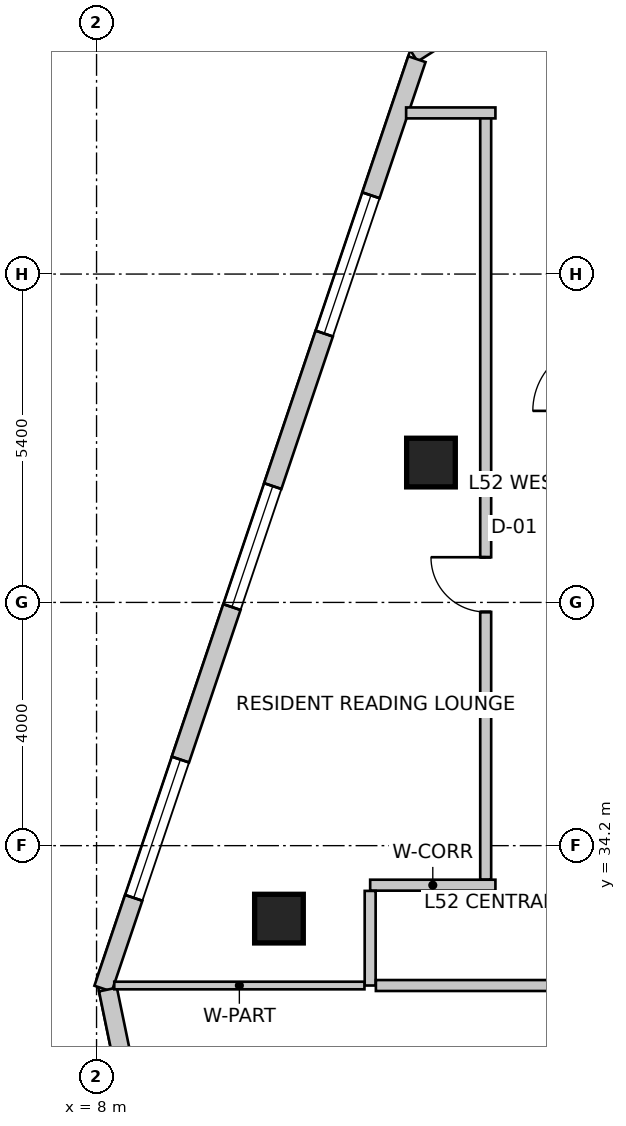
"""IFC4 building model, lengths in metres.
Left out: names, types, materials, properties, quantities, classifications, styles, units other than length and angle.
Written with IfcOpenShell. Run it as: python <this file> out.ifc"""

import sys

from ifc_helpers import new_model, si_unit, direction, frame, frame_2d, origin, origin_2d, place, context, subcontext, project, spatial, rectangle, extrude, source, transform, mapped, element, fill, save


model = new_model("IFC4")
c1 = context("Model", 3, precision=1e-05, world=origin(), true_north=direction((0.0, 1.0)))
c2 = subcontext(c1, "Body", "Model", "MODEL_VIEW")
j1 = project(units=[si_unit("LENGTHUNIT", "METRE"), si_unit("PLANEANGLEUNIT", "RADIAN")], contexts=[c1])
p1 = place(None, origin())
s1 = spatial("IfcSite", under=j1, at=p1, CompositionType="ELEMENT")
p2 = place(p1, origin())
s2 = spatial("IfcBuilding", under=s1, at=p2, CompositionType="ELEMENT")
p3 = place(p2, frame((0.0, 0.0, 207.9)))
s3 = spatial("IfcBuildingStorey", under=s2, at=p3, CompositionType="ELEMENT", Elevation=207.9)
m1 = source(origin(), c2, "Body", "SweptSolid", [
    extrude(rectangle(XDim=0.8, YDim=0.8, at=origin_2d()), origin(), (0.0, 0.0, 1.0), 3.5),
])
for number, where, z_axis, x_axis in (
    (1, (11.0, 33.0, 0.0), (0.0, 0.0, 1.0), (1.0, 0.0, 0.0)),
    (2, (13.5, 40.5, 0.0), (0.0, 0.0, 1.0), (1.0, 0.0, 0.0)),
):
    element("IfcColumn", number, at=place(p3, frame(where, z_axis=z_axis, x_axis=x_axis)), inside=s3, PredefinedType="COLUMN", context=c2, shape_type="MappedRepresentation", body=[
        mapped(m1, transform((0.0, 0.0, 0.0), scale=1.0)),
    ])
p4 = place(p3, frame((21.875, 52.742, 0.0), z_axis=(0.0, 0.0, 1.0), x_axis=(-0.843666375448, -0.536867811419, 0.0)))
e3 = element("IfcWall", 3, at=p4, inside=s3, PredefinedType="SOLIDWALL", context=c2, shape_type="SweptSolid", body=[
    extrude(rectangle(XDim=10.284, YDim=0.3, at=frame_2d((5.142, 0.0))), origin(), (0.0, 0.0, 1.0), 3.2),
])
m2 = source(origin(), c2, "Body", "SweptSolid", [
    extrude(rectangle(XDim=2.1, YDim=2.0, at=frame_2d((1.05, 1.0))), frame((0.0, 0.16, 0.0), z_axis=(0.0, -1.0, 0.0), x_axis=(1.0, 0.0, 0.0)), (0.0, 0.0, 1.0), 0.32),
])
p5 = place(p4, frame((3.457, 0.0, 0.85)))
e4 = element("IfcOpeningElement", 4, at=p5, cuts=e3, PredefinedType="OPENING", context=c2, shape_type="MappedRepresentation", body=[
    mapped(m2, transform((0.0, 0.0, 0.0), scale=1.0)),
])
p6 = place(p3, frame((13.269, 47.134, 0.0), z_axis=(0.0, 0.0, 1.0), x_axis=(-0.319920776449, -0.947444297464, 0.0)))
e5 = element("IfcWall", 5, at=p6, inside=s3, PredefinedType="SOLIDWALL", context=c2, shape_type="SweptSolid", body=[
    extrude(rectangle(XDim=16.133, YDim=0.3, at=frame_2d((8.067, 0.0))), origin(), (0.0, 0.0, 1.0), 3.2),
])
m3 = source(origin(), c2, "Body", "SweptSolid", [
    extrude(rectangle(XDim=2.4, YDim=2.2, at=frame_2d((1.2, 1.1))), frame((0.0, 0.16, 0.0), z_axis=(0.0, -1.0, 0.0), x_axis=(1.0, 0.0, 0.0)), (0.0, 0.0, 1.0), 0.32),
])
p7 = place(p6, frame((2.363, 0.0, 0.85)))
e6 = element("IfcOpeningElement", 6, at=p7, cuts=e5, PredefinedType="OPENING", context=c2, shape_type="MappedRepresentation", body=[
    mapped(m3, transform((0.0, 0.0, 0.0), scale=1.0)),
])
p8 = place(p6, frame((7.41, 0.0, 0.85)))
e7 = element("IfcOpeningElement", 7, at=p8, cuts=e5, PredefinedType="OPENING", context=c2, shape_type="MappedRepresentation", body=[
    mapped(m2, transform((0.0, 0.0, 0.0), scale=1.0)),
])
p9 = place(p6, frame((12.157, 0.0, 0.85)))
e8 = element("IfcOpeningElement", 8, at=p9, cuts=e5, PredefinedType="OPENING", context=c2, shape_type="MappedRepresentation", body=[
    mapped(m3, transform((0.0, 0.0, 0.0), scale=1.0)),
])
p10 = place(p3, frame((8.188, 31.834, 0.0), z_axis=(0.0, 0.0, 1.0), x_axis=(0.202303475707, -0.979322880217, 0.0)))
e9 = element("IfcWall", 9, at=p10, inside=s3, PredefinedType="SOLIDWALL", context=c2, shape_type="SweptSolid", body=[
    extrude(rectangle(XDim=15.766, YDim=0.3, at=frame_2d((7.883, 0.0))), origin(), (0.0, 0.0, 1.0), 3.2),
])
m4 = source(origin(), c2, "Body", "SweptSolid", [
    extrude(rectangle(XDim=1.6, YDim=2.15, at=frame_2d((0.8, 1.075))), frame((0.0, 0.16, 0.0), z_axis=(0.0, -1.0, 0.0), x_axis=(1.0, 0.0, 0.0)), (0.0, 0.0, 1.0), 0.32),
])
p11 = place(p10, frame((9.466, 0.0, 0.0)))
e10 = element("IfcOpeningElement", 10, at=p11, cuts=e9, PredefinedType="OPENING", context=c2, shape_type="MappedRepresentation", body=[
    mapped(m4, transform((0.0, 0.0, 0.0), scale=1.0)),
])
p12 = place(p10, frame((1.487, 0.0, 0.85)))
e11 = element("IfcOpeningElement", 11, at=p12, cuts=e9, PredefinedType="OPENING", context=c2, shape_type="MappedRepresentation", body=[
    mapped(m2, transform((0.0, 0.0, 0.0), scale=1.0)),
])
p13 = place(p10, frame((5.769, 0.0, 0.85)))
e12 = element("IfcOpeningElement", 12, at=p13, cuts=e9, PredefinedType="OPENING", context=c2, shape_type="MappedRepresentation", body=[
    mapped(m3, transform((0.0, 0.0, 0.0), scale=1.0)),
])
p14 = place(p10, frame((11.588, 0.0, 0.85)))
e13 = element("IfcOpeningElement", 13, at=p14, cuts=e9, PredefinedType="OPENING", context=c2, shape_type="MappedRepresentation", body=[
    mapped(m2, transform((0.0, 0.0, 0.0), scale=1.0)),
])
p15 = place(p3, frame((12.5, 33.55, 0.0), z_axis=(0.0, 0.0, 1.0), x_axis=(1.0, 0.0, 0.0)))
e14 = element("IfcWall", 14, at=p15, inside=s3, PredefinedType="PARTITIONING", context=c2, shape_type="SweptSolid", body=[
    extrude(rectangle(XDim=2.06, YDim=0.18, at=frame_2d((1.03, 0.0))), origin(), (0.0, 0.0, 1.0), 3.2),
])
p16 = place(p3, frame((12.5, 31.9, 0.0), z_axis=(0.0, 0.0, 1.0), x_axis=(0.0, 1.0, 0.0)))
e15 = element("IfcWall", 15, at=p16, inside=s3, PredefinedType="PARTITIONING", context=c2, shape_type="SweptSolid", body=[
    extrude(rectangle(XDim=1.556, YDim=0.18, at=frame_2d((0.778, 0.0))), origin(), (0.0, 0.0, 1.0), 2.869),
])
p17 = place(p3, frame((29.265, 31.9, 0.0), z_axis=(0.0, 0.0, 1.0), x_axis=(-1.0, 0.0, 0.0)))
e16 = element("IfcWall", 16, at=p17, inside=s3, PredefinedType="PARTITIONING", context=c2, shape_type="SweptSolid", body=[
    extrude(rectangle(XDim=16.671, YDim=0.18, at=frame_2d((8.335, 0.0))), origin(), (0.0, 0.0, 1.0), 2.869),
])
m5 = source(origin(), c2, "Body", "SweptSolid", [
    extrude(rectangle(XDim=1.6, YDim=2.15, at=frame_2d((0.8, 1.075))), frame((0.0, 0.1, 0.0), z_axis=(0.0, -1.0, 0.0), x_axis=(1.0, 0.0, 0.0)), (0.0, 0.0, 1.0), 0.2),
])
p18 = place(p17, frame((7.536, 0.0, 0.0)))
e17 = element("IfcOpeningElement", 17, at=p18, cuts=e16, PredefinedType="OPENING", context=c2, shape_type="MappedRepresentation", body=[
    mapped(m5, transform((0.0, 0.0, 0.0), scale=1.0)),
])
p19 = place(p3, frame((14.4, 33.644, 0.0), z_axis=(0.0, 0.0, 1.0), x_axis=(0.0, 1.0, 0.0)))
e18 = element("IfcWall", 18, at=p19, inside=s3, PredefinedType="PARTITIONING", context=c2, shape_type="SweptSolid", body=[
    extrude(rectangle(XDim=12.606, YDim=0.18, at=frame_2d((6.303, 0.0))), origin(), (0.0, 0.0, 1.0), 3.2),
])
m6 = source(origin(), c2, "Body", "SweptSolid", [
    extrude(rectangle(XDim=0.9, YDim=2.15, at=frame_2d((0.45, 1.075))), frame((0.0, 0.1, 0.0), z_axis=(0.0, -1.0, 0.0), x_axis=(1.0, 0.0, 0.0)), (0.0, 0.0, 1.0), 0.2),
])
p20 = place(p19, frame((4.399, 0.0, 0.0)))
e19 = element("IfcOpeningElement", 19, at=p20, cuts=e18, PredefinedType="OPENING", context=c2, shape_type="MappedRepresentation", body=[
    mapped(m6, transform((0.0, 0.0, 0.0), scale=1.0)),
])
p21 = place(p3, frame((14.56, 46.25, 0.0), z_axis=(0.0, 0.0, 1.0), x_axis=(-1.0, 0.0, 0.0)))
e20 = element("IfcWall", 20, at=p21, inside=s3, PredefinedType="PARTITIONING", context=c2, shape_type="SweptSolid", body=[
    extrude(rectangle(XDim=1.469, YDim=0.18, at=frame_2d((0.734, 0.0))), origin(), (0.0, 0.0, 1.0), 3.2),
])
p22 = place(p3, frame((12.406, 31.9, 0.0), z_axis=(0.0, 0.0, 1.0), x_axis=(-1.0, 0.0, 0.0)))
e21 = element("IfcWall", 21, at=p22, inside=s3, PredefinedType="PARTITIONING", context=c2, shape_type="SweptSolid", body=[
    extrude(rectangle(XDim=4.115, YDim=0.125, at=frame_2d((2.057, 0.0))), origin(), (0.0, 0.0, 1.0), 2.492),
])
m7 = source(origin(), c2, "Body", "SweptSolid", [
    extrude(rectangle(XDim=2.4, YDim=2.2, at=frame_2d((1.2, 1.1))), frame((0.0, -0.015, 0.0), z_axis=(0.0, -1.0, 0.0), x_axis=(1.0, 0.0, 0.0)), (0.0, 0.0, 1.0), 0.06),
])
p23 = place(p7, origin())
e22 = element("IfcWindow", 22, at=p23, inside=s3, PartitioningType="SINGLE_PANEL", PredefinedType="WINDOW", context=c2, shape_type="MappedRepresentation", body=[
    mapped(m7, transform((0.0, 0.0, 0.0), scale=1.0)),
])
fill(e6, e22)
m8 = source(origin(), c2, "Body", "SweptSolid", [
    extrude(rectangle(XDim=2.1, YDim=2.0, at=frame_2d((1.05, 1.0))), frame((0.0, -0.015, 0.0), z_axis=(0.0, -1.0, 0.0), x_axis=(1.0, 0.0, 0.0)), (0.0, 0.0, 1.0), 0.06),
])
p24 = place(p8, origin())
e23 = element("IfcWindow", 23, at=p24, inside=s3, PartitioningType="SINGLE_PANEL", PredefinedType="WINDOW", context=c2, shape_type="MappedRepresentation", body=[
    mapped(m8, transform((0.0, 0.0, 0.0), scale=1.0)),
])
fill(e7, e23)
p25 = place(p9, origin())
e24 = element("IfcWindow", 24, at=p25, inside=s3, PartitioningType="SINGLE_PANEL", PredefinedType="WINDOW", context=c2, shape_type="MappedRepresentation", body=[
    mapped(m7, transform((0.0, 0.0, 0.0), scale=1.0)),
])
fill(e8, e24)
m9 = source(origin(), c2, "Body", "SweptSolid", [
    extrude(rectangle(XDim=0.9, YDim=2.15, at=frame_2d((0.45, 1.075))), frame((0.0, 0.025, 0.0), z_axis=(0.0, -1.0, 0.0), x_axis=(1.0, 0.0, 0.0)), (0.0, 0.0, 1.0), 0.05),
])
p26 = place(p20, origin())
e25 = element("IfcDoor", 25, at=p26, inside=s3, OperationType="SINGLE_SWING_RIGHT", PredefinedType="DOOR", context=c2, shape_type="MappedRepresentation", body=[
    mapped(m9, transform((0.0, 0.0, 0.0), scale=1.0)),
])
fill(e19, e25)
save(model, sys.argv[1])
